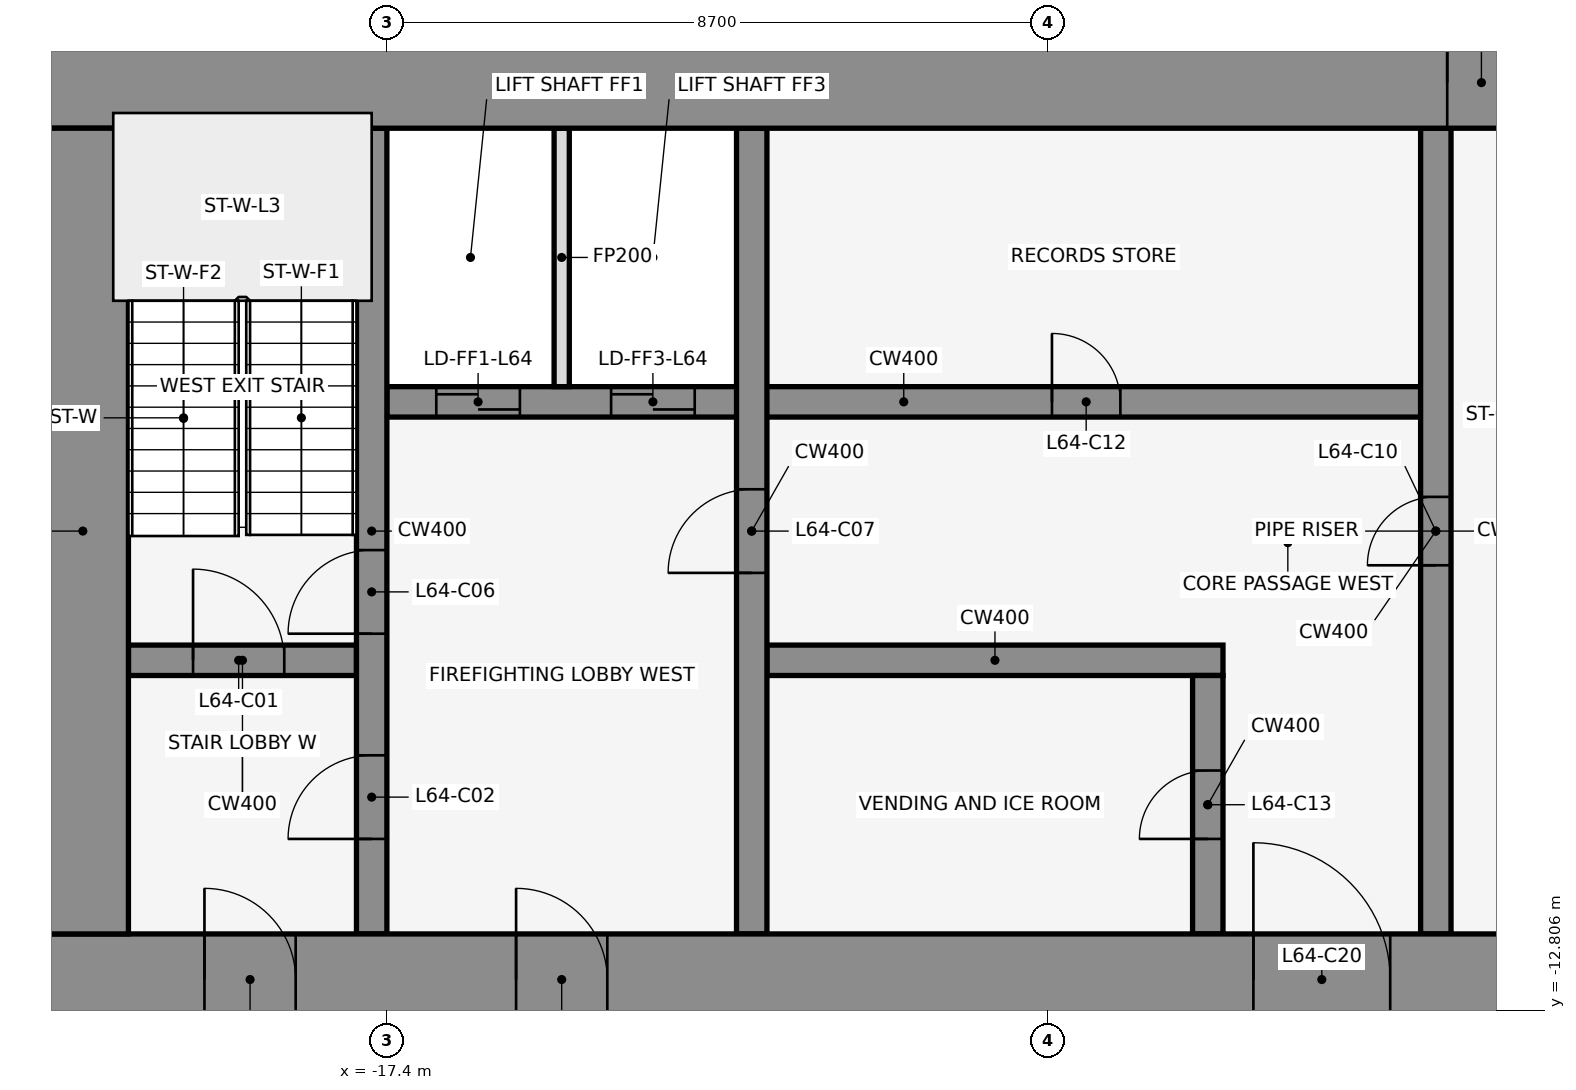
"""IFC4 building model, lengths in metres.
Left out: names, types, materials, properties, quantities, classifications, styles, units other than length and angle.
Written with IfcOpenShell. Run it as: python <this file> out.ifc"""

import sys

from ifc_helpers import new_model, si_unit, direction, frame, frame_2d, origin, place, context, subcontext, project, spatial, rectangle, extrude, element, fill, save


model = new_model("IFC4")
c1 = context("Model", 3, precision=1e-05, world=origin(), true_north=direction((0.0, 1.0)))
c2 = subcontext(c1, "Body", "Model", "MODEL_VIEW")
j1 = project(units=[si_unit("LENGTHUNIT", "METRE"), si_unit("PLANEANGLEUNIT", "RADIAN")], contexts=[c1])
p1 = place(None, origin())
s1 = spatial("IfcSite", under=j1, at=p1, CompositionType="ELEMENT")
p2 = place(p1, origin())
s2 = spatial("IfcBuilding", under=s1, at=p2, CompositionType="ELEMENT")
p3 = place(p2, frame((0.0, 0.0, 283.4)))
s3 = spatial("IfcBuildingStorey", under=s2, at=p3, CompositionType="ELEMENT", Elevation=283.4)
p4 = place(p3, frame((-14.599, 1.08, 0.0), z_axis=(0.0, 0.0, 1.0), x_axis=(-0.83981312244, -0.542875602121, 0.0)))
e1 = element("IfcWall", 1, at=p4, inside=s3, PredefinedType="STANDARD", context=c2, shape_type="SweptSolid", body=[
    extrude(rectangle(XDim=2.183, YDim=0.25, at=frame_2d((1.091, 0.0))), origin(), (0.0, 0.0, 1.0), 4.0),
])
p5 = place(p3, frame((-20.8, -8.2, 0.0), z_axis=(0.0, 0.0, 1.0), x_axis=(1.0, 0.0, 0.0)))
e2 = element("IfcWall", 2, at=p5, inside=s3, PredefinedType="SHEAR", context=c2, shape_type="SweptSolid", body=[
    extrude(rectangle(XDim=3.0, YDim=0.4, at=frame_2d((1.5, 0.0))), origin(), (0.0, 0.0, 1.0), 4.2),
])
p6 = place(p5, frame((0.85, 0.0, 0.0)))
e3 = element("IfcOpeningElement", 3, at=p6, cuts=e2, PredefinedType="OPENING", context=c2, shape_type="SweptSolid", body=[
    extrude(rectangle(XDim=1.2, YDim=2.1, at=frame_2d((0.6, 1.05))), frame((0.0, 0.212, 0.0), z_axis=(0.0, -1.0, 0.0), x_axis=(1.0, 0.0, 0.0)), (0.0, 0.0, 1.0), 0.424),
])
p7 = place(p3, frame((-12.4, -8.2, 0.0), z_axis=(0.0, 0.0, 1.0), x_axis=(1.0, 0.0, 0.0)))
e4 = element("IfcWall", 4, at=p7, inside=s3, PredefinedType="SHEAR", context=c2, shape_type="SweptSolid", body=[
    extrude(rectangle(XDim=6.0, YDim=0.4, at=frame_2d((3.0, 0.0))), origin(), (0.0, 0.0, 1.0), 4.2),
])
p8 = place(p3, frame((-17.4, -4.8, 0.0), z_axis=(0.0, 0.0, 1.0), x_axis=(1.0, 0.0, 0.0)))
e5 = element("IfcWall", 5, at=p8, inside=s3, PredefinedType="SHEAR", context=c2, shape_type="SweptSolid", body=[
    extrude(rectangle(XDim=13.6, YDim=0.4, at=frame_2d((6.8, 0.0))), origin(), (0.0, 0.0, 1.0), 4.2),
])
p9 = place(p8, frame((0.65, 0.0, 0.0)))
e6 = element("IfcOpeningElement", 6, at=p9, cuts=e5, PredefinedType="OPENING", context=c2, shape_type="SweptSolid", body=[
    extrude(rectangle(XDim=1.1, YDim=2.1, at=frame_2d((0.55, 1.05))), frame((0.0, 0.212, 0.0), z_axis=(0.0, -1.0, 0.0), x_axis=(1.0, 0.0, 0.0)), (0.0, 0.0, 1.0), 0.424),
])
p10 = place(p8, frame((2.95, 0.0, 0.0)))
e7 = element("IfcOpeningElement", 7, at=p10, cuts=e5, PredefinedType="OPENING", context=c2, shape_type="SweptSolid", body=[
    extrude(rectangle(XDim=1.1, YDim=2.1, at=frame_2d((0.55, 1.05))), frame((0.0, 0.212, 0.0), z_axis=(0.0, -1.0, 0.0), x_axis=(1.0, 0.0, 0.0)), (0.0, 0.0, 1.0), 0.424),
])
p11 = place(p8, frame((8.75, 0.0, 0.0)))
e8 = element("IfcOpeningElement", 8, at=p11, cuts=e5, PredefinedType="OPENING", context=c2, shape_type="SweptSolid", body=[
    extrude(rectangle(XDim=0.9, YDim=2.1, at=frame_2d((0.45, 1.05))), frame((0.0, 0.212, 0.0), z_axis=(0.0, -1.0, 0.0), x_axis=(1.0, 0.0, 0.0)), (0.0, 0.0, 1.0), 0.424),
])
p12 = place(p3, frame((-17.6, -11.8, 0.0), z_axis=(0.0, 0.0, 1.0), x_axis=(0.0, 1.0, 0.0)))
e9 = element("IfcWall", 9, at=p12, inside=s3, PredefinedType="SHEAR", context=c2, shape_type="SweptSolid", body=[
    extrude(rectangle(XDim=10.6, YDim=0.4, at=frame_2d((5.3, 0.0))), origin(), (0.0, 0.0, 1.0), 4.2),
])
p13 = place(p12, frame((1.25, 0.0, 0.0)))
e10 = element("IfcOpeningElement", 10, at=p13, cuts=e9, PredefinedType="OPENING", context=c2, shape_type="SweptSolid", body=[
    extrude(rectangle(XDim=1.1, YDim=2.1, at=frame_2d((0.55, 1.05))), frame((0.0, 0.212, 0.0), z_axis=(0.0, -1.0, 0.0), x_axis=(1.0, 0.0, 0.0)), (0.0, 0.0, 1.0), 0.424),
])
p14 = place(p12, frame((3.95, 0.0, 0.0)))
e11 = element("IfcOpeningElement", 11, at=p14, cuts=e9, PredefinedType="OPENING", context=c2, shape_type="SweptSolid", body=[
    extrude(rectangle(XDim=1.1, YDim=2.1, at=frame_2d((0.55, 1.05))), frame((0.0, 0.212, 0.0), z_axis=(0.0, -1.0, 0.0), x_axis=(1.0, 0.0, 0.0)), (0.0, 0.0, 1.0), 0.424),
])
p15 = place(p3, frame((-15.1, -4.6, 0.0), z_axis=(0.0, 0.0, 1.0), x_axis=(0.0, 1.0, 0.0)))
e12 = element("IfcWall", 12, at=p15, inside=s3, PredefinedType="PARTITIONING", context=c2, shape_type="SweptSolid", body=[
    extrude(rectangle(XDim=3.4, YDim=0.2, at=frame_2d((1.7, 0.0))), origin(), (0.0, 0.0, 1.0), 3.068),
])
p16 = place(p3, frame((-12.6, -11.8, 0.0), z_axis=(0.0, 0.0, 1.0), x_axis=(0.0, 1.0, 0.0)))
e13 = element("IfcWall", 13, at=p16, inside=s3, PredefinedType="SHEAR", context=c2, shape_type="SweptSolid", body=[
    extrude(rectangle(XDim=10.6, YDim=0.4, at=frame_2d((5.3, 0.0))), origin(), (0.0, 0.0, 1.0), 4.2),
])
p17 = place(p16, frame((4.75, 0.0, 0.0)))
e14 = element("IfcOpeningElement", 14, at=p17, cuts=e13, PredefinedType="OPENING", context=c2, shape_type="SweptSolid", body=[
    extrude(rectangle(XDim=1.1, YDim=2.1, at=frame_2d((0.55, 1.05))), frame((0.0, 0.212, 0.0), z_axis=(0.0, -1.0, 0.0), x_axis=(1.0, 0.0, 0.0)), (0.0, 0.0, 1.0), 0.424),
])
p18 = place(p3, frame((-6.6, -11.8, 0.0), z_axis=(0.0, 0.0, 1.0), x_axis=(0.0, 1.0, 0.0)))
e15 = element("IfcWall", 15, at=p18, inside=s3, PredefinedType="SHEAR", context=c2, shape_type="SweptSolid", body=[
    extrude(rectangle(XDim=3.4, YDim=0.4, at=frame_2d((1.7, 0.0))), origin(), (0.0, 0.0, 1.0), 4.2),
])
p19 = place(p18, frame((1.25, 0.0, 0.0)))
e16 = element("IfcOpeningElement", 16, at=p19, cuts=e15, PredefinedType="OPENING", context=c2, shape_type="SweptSolid", body=[
    extrude(rectangle(XDim=0.9, YDim=2.1, at=frame_2d((0.45, 1.05))), frame((0.0, 0.212, 0.0), z_axis=(0.0, -1.0, 0.0), x_axis=(1.0, 0.0, 0.0)), (0.0, 0.0, 1.0), 0.424),
])
p20 = place(p3, frame((-3.6, -11.8, 0.0), z_axis=(0.0, 0.0, 1.0), x_axis=(0.0, 1.0, 0.0)))
e17 = element("IfcWall", 17, at=p20, inside=s3, PredefinedType="SHEAR", context=c2, shape_type="SweptSolid", body=[
    extrude(rectangle(XDim=10.6, YDim=0.4, at=frame_2d((5.3, 0.0))), origin(), (0.0, 0.0, 1.0), 4.2),
])
p21 = place(p20, frame((4.85, 0.0, 0.0)))
e18 = element("IfcOpeningElement", 18, at=p21, cuts=e17, PredefinedType="OPENING", context=c2, shape_type="SweptSolid", body=[
    extrude(rectangle(XDim=0.9, YDim=2.1, at=frame_2d((0.45, 1.05))), frame((0.0, 0.212, 0.0), z_axis=(0.0, -1.0, 0.0), x_axis=(1.0, 0.0, 0.0)), (0.0, 0.0, 1.0), 0.424),
])
p22 = place(p3, frame((-22.0, -0.6, 0.0), z_axis=(0.0, 0.0, 1.0), x_axis=(1.0, 0.0, 0.0)))
e19 = element("IfcWall", 19, at=p22, inside=s3, PredefinedType="SHEAR", context=c2, shape_type="SweptSolid", body=[
    extrude(rectangle(XDim=44.0, YDim=1.2, at=frame_2d((22.0, 0.0))), origin(), (0.0, 0.0, 1.0), 4.2),
])
p23 = place(p22, frame((18.55, 0.0, 0.0)))
e20 = element("IfcOpeningElement", 20, at=p23, cuts=e19, PredefinedType="OPENING", context=c2, shape_type="SweptSolid", body=[
    extrude(rectangle(XDim=0.9, YDim=2.1, at=frame_2d((0.45, 1.05))), frame((0.0, 0.612, 0.0), z_axis=(0.0, -1.0, 0.0), x_axis=(1.0, 0.0, 0.0)), (0.0, 0.0, 1.0), 1.224),
])
p24 = place(p22, frame((24.55, 0.0, 0.0)))
e21 = element("IfcOpeningElement", 21, at=p24, cuts=e19, PredefinedType="OPENING", context=c2, shape_type="SweptSolid", body=[
    extrude(rectangle(XDim=0.9, YDim=2.1, at=frame_2d((0.45, 1.05))), frame((0.0, 0.612, 0.0), z_axis=(0.0, -1.0, 0.0), x_axis=(1.0, 0.0, 0.0)), (0.0, 0.0, 1.0), 1.224),
])
p25 = place(p3, frame((-22.0, -12.4, 0.0), z_axis=(0.0, 0.0, 1.0), x_axis=(1.0, 0.0, 0.0)))
e22 = element("IfcWall", 22, at=p25, inside=s3, PredefinedType="SHEAR", context=c2, shape_type="SweptSolid", body=[
    extrude(rectangle(XDim=44.0, YDim=1.2, at=frame_2d((22.0, 0.0))), origin(), (0.0, 0.0, 1.0), 4.2),
])
p26 = place(p25, frame((2.2, 0.0, 0.0)))
e23 = element("IfcOpeningElement", 23, at=p26, cuts=e22, PredefinedType="OPENING", context=c2, shape_type="SweptSolid", body=[
    extrude(rectangle(XDim=1.2, YDim=2.1, at=frame_2d((0.6, 1.05))), frame((0.0, 0.612, 0.0), z_axis=(0.0, -1.0, 0.0), x_axis=(1.0, 0.0, 0.0)), (0.0, 0.0, 1.0), 1.224),
])
p27 = place(p25, frame((21.4, 0.0, 0.0)))
e24 = element("IfcOpeningElement", 24, at=p27, cuts=e22, PredefinedType="OPENING", context=c2, shape_type="SweptSolid", body=[
    extrude(rectangle(XDim=1.2, YDim=2.1, at=frame_2d((0.6, 1.05))), frame((0.0, 0.612, 0.0), z_axis=(0.0, -1.0, 0.0), x_axis=(1.0, 0.0, 0.0)), (0.0, 0.0, 1.0), 1.224),
])
p28 = place(p25, frame((40.6, 0.0, 0.0)))
e25 = element("IfcOpeningElement", 25, at=p28, cuts=e22, PredefinedType="OPENING", context=c2, shape_type="SweptSolid", body=[
    extrude(rectangle(XDim=1.2, YDim=2.1, at=frame_2d((0.6, 1.05))), frame((0.0, 0.612, 0.0), z_axis=(0.0, -1.0, 0.0), x_axis=(1.0, 0.0, 0.0)), (0.0, 0.0, 1.0), 1.224),
])
p29 = place(p25, frame((16.0, 0.0, 0.0)))
e26 = element("IfcOpeningElement", 26, at=p29, cuts=e22, PredefinedType="OPENING", context=c2, shape_type="SweptSolid", body=[
    extrude(rectangle(XDim=1.8, YDim=2.1, at=frame_2d((0.9, 1.05))), frame((0.0, 0.612, 0.0), z_axis=(0.0, -1.0, 0.0), x_axis=(1.0, 0.0, 0.0)), (0.0, 0.0, 1.0), 1.224),
])
p30 = place(p25, frame((6.3, 0.0, 0.0)))
e27 = element("IfcOpeningElement", 27, at=p30, cuts=e22, PredefinedType="OPENING", context=c2, shape_type="SweptSolid", body=[
    extrude(rectangle(XDim=1.2, YDim=2.1, at=frame_2d((0.6, 1.05))), frame((0.0, 0.612, 0.0), z_axis=(0.0, -1.0, 0.0), x_axis=(1.0, 0.0, 0.0)), (0.0, 0.0, 1.0), 1.224),
])
p31 = place(p25, frame((26.2, 0.0, 0.0)))
e28 = element("IfcOpeningElement", 28, at=p31, cuts=e22, PredefinedType="OPENING", context=c2, shape_type="SweptSolid", body=[
    extrude(rectangle(XDim=1.8, YDim=2.1, at=frame_2d((0.9, 1.05))), frame((0.0, 0.612, 0.0), z_axis=(0.0, -1.0, 0.0), x_axis=(1.0, 0.0, 0.0)), (0.0, 0.0, 1.0), 1.224),
])
p32 = place(p25, frame((36.5, 0.0, 0.0)))
e29 = element("IfcOpeningElement", 29, at=p32, cuts=e22, PredefinedType="OPENING", context=c2, shape_type="SweptSolid", body=[
    extrude(rectangle(XDim=1.2, YDim=2.1, at=frame_2d((0.6, 1.05))), frame((0.0, 0.612, 0.0), z_axis=(0.0, -1.0, 0.0), x_axis=(1.0, 0.0, 0.0)), (0.0, 0.0, 1.0), 1.224),
])
p33 = place(p3, frame((-21.4, -11.8, 0.0), z_axis=(0.0, 0.0, 1.0), x_axis=(0.0, 1.0, 0.0)))
e30 = element("IfcWall", 30, at=p33, inside=s3, PredefinedType="SHEAR", context=c2, shape_type="SweptSolid", body=[
    extrude(rectangle(XDim=10.6, YDim=1.2, at=frame_2d((5.3, 0.0))), origin(), (0.0, 0.0, 1.0), 4.2),
])
p34 = place(p6, origin())
e31 = element("IfcDoor", 31, at=p34, inside=s3, OperationType="SINGLE_SWING_LEFT", PredefinedType="DOOR", context=c2, shape_type="SweptSolid", body=[
    extrude(rectangle(XDim=1.2, YDim=2.1, at=frame_2d((0.6, 1.05))), frame((0.0, 0.025, 0.0), z_axis=(0.0, -1.0, 0.0), x_axis=(1.0, 0.0, 0.0)), (0.0, 0.0, 1.0), 0.05),
])
fill(e3, e31)
p35 = place(p13, frame((1.1, 0.0, 0.0), z_axis=(0.0, 0.0, 1.0), x_axis=(-1.0, 0.0, 0.0)))
e32 = element("IfcDoor", 32, at=p35, inside=s3, OperationType="SINGLE_SWING_LEFT", PredefinedType="DOOR", context=c2, shape_type="SweptSolid", body=[
    extrude(rectangle(XDim=1.1, YDim=2.1, at=frame_2d((0.55, 1.05))), frame((0.0, 0.025, 0.0), z_axis=(0.0, -1.0, 0.0), x_axis=(1.0, 0.0, 0.0)), (0.0, 0.0, 1.0), 0.05),
])
fill(e10, e32)
p36 = place(p9, origin())
e33 = element("IfcDoor", 33, at=p36, inside=s3, OperationType="DOUBLE_DOOR_SLIDING", PredefinedType="DOOR", context=c2, shape_type="SweptSolid", body=[
    extrude(rectangle(XDim=1.1, YDim=2.1, at=frame_2d((0.55, 1.05))), frame((0.0, 0.025, 0.0), z_axis=(0.0, -1.0, 0.0), x_axis=(1.0, 0.0, 0.0)), (0.0, 0.0, 1.0), 0.05),
])
fill(e6, e33)
p37 = place(p10, origin())
e34 = element("IfcDoor", 34, at=p37, inside=s3, OperationType="DOUBLE_DOOR_SLIDING", PredefinedType="DOOR", context=c2, shape_type="SweptSolid", body=[
    extrude(rectangle(XDim=1.1, YDim=2.1, at=frame_2d((0.55, 1.05))), frame((0.0, 0.025, 0.0), z_axis=(0.0, -1.0, 0.0), x_axis=(1.0, 0.0, 0.0)), (0.0, 0.0, 1.0), 0.05),
])
fill(e7, e34)
p38 = place(p14, frame((1.1, 0.0, 0.0), z_axis=(0.0, 0.0, 1.0), x_axis=(-1.0, 0.0, 0.0)))
e35 = element("IfcDoor", 35, at=p38, inside=s3, OperationType="SINGLE_SWING_LEFT", PredefinedType="DOOR", context=c2, shape_type="SweptSolid", body=[
    extrude(rectangle(XDim=1.1, YDim=2.1, at=frame_2d((0.55, 1.05))), frame((0.0, 0.025, 0.0), z_axis=(0.0, -1.0, 0.0), x_axis=(1.0, 0.0, 0.0)), (0.0, 0.0, 1.0), 0.05),
])
fill(e11, e35)
p39 = place(p17, origin())
e36 = element("IfcDoor", 36, at=p39, inside=s3, OperationType="SINGLE_SWING_LEFT", PredefinedType="DOOR", context=c2, shape_type="SweptSolid", body=[
    extrude(rectangle(XDim=1.1, YDim=2.1, at=frame_2d((0.55, 1.05))), frame((0.0, 0.025, 0.0), z_axis=(0.0, -1.0, 0.0), x_axis=(1.0, 0.0, 0.0)), (0.0, 0.0, 1.0), 0.05),
])
fill(e14, e36)
p40 = place(p21, frame((0.9, 0.0, 0.0), z_axis=(0.0, 0.0, 1.0), x_axis=(-1.0, 0.0, 0.0)))
e37 = element("IfcDoor", 37, at=p40, inside=s3, OperationType="SINGLE_SWING_LEFT", PredefinedType="DOOR", context=c2, shape_type="SweptSolid", body=[
    extrude(rectangle(XDim=0.9, YDim=2.1, at=frame_2d((0.45, 1.05))), frame((0.0, 0.025, 0.0), z_axis=(0.0, -1.0, 0.0), x_axis=(1.0, 0.0, 0.0)), (0.0, 0.0, 1.0), 0.05),
])
fill(e18, e37)
p41 = place(p11, origin())
e38 = element("IfcDoor", 38, at=p41, inside=s3, OperationType="SINGLE_SWING_RIGHT", PredefinedType="DOOR", context=c2, shape_type="SweptSolid", body=[
    extrude(rectangle(XDim=0.9, YDim=2.1, at=frame_2d((0.45, 1.05))), frame((0.0, 0.025, 0.0), z_axis=(0.0, -1.0, 0.0), x_axis=(1.0, 0.0, 0.0)), (0.0, 0.0, 1.0), 0.05),
])
fill(e8, e38)
p42 = place(p19, origin())
e39 = element("IfcDoor", 39, at=p42, inside=s3, OperationType="SINGLE_SWING_LEFT", PredefinedType="DOOR", context=c2, shape_type="SweptSolid", body=[
    extrude(rectangle(XDim=0.9, YDim=2.1, at=frame_2d((0.45, 1.05))), frame((0.0, 0.025, 0.0), z_axis=(0.0, -1.0, 0.0), x_axis=(1.0, 0.0, 0.0)), (0.0, 0.0, 1.0), 0.05),
])
fill(e16, e39)
p43 = place(p23, origin())
e40 = element("IfcDoor", 40, at=p43, inside=s3, OperationType="SINGLE_SWING_LEFT", PredefinedType="DOOR", context=c2, shape_type="SweptSolid", body=[
    extrude(rectangle(XDim=0.9, YDim=2.1, at=frame_2d((0.45, 1.05))), frame((0.0, 0.025, 0.0), z_axis=(0.0, -1.0, 0.0), x_axis=(1.0, 0.0, 0.0)), (0.0, 0.0, 1.0), 0.05),
])
fill(e20, e40)
p44 = place(p26, frame((1.2, 0.0, 0.0), z_axis=(0.0, 0.0, 1.0), x_axis=(-1.0, 0.0, 0.0)))
e41 = element("IfcDoor", 41, at=p44, inside=s3, OperationType="SINGLE_SWING_RIGHT", PredefinedType="DOOR", context=c2, shape_type="SweptSolid", body=[
    extrude(rectangle(XDim=1.2, YDim=2.1, at=frame_2d((0.6, 1.05))), frame((0.0, 0.025, 0.0), z_axis=(0.0, -1.0, 0.0), x_axis=(1.0, 0.0, 0.0)), (0.0, 0.0, 1.0), 0.05),
])
fill(e23, e41)
p45 = place(p29, origin())
e42 = element("IfcDoor", 42, at=p45, inside=s3, OperationType="SINGLE_SWING_LEFT", PredefinedType="DOOR", context=c2, shape_type="SweptSolid", body=[
    extrude(rectangle(XDim=1.8, YDim=2.1, at=frame_2d((0.9, 1.05))), frame((0.0, 0.025, 0.0), z_axis=(0.0, -1.0, 0.0), x_axis=(1.0, 0.0, 0.0)), (0.0, 0.0, 1.0), 0.05),
])
fill(e26, e42)
p46 = place(p30, frame((1.2, 0.0, 0.0), z_axis=(0.0, 0.0, 1.0), x_axis=(-1.0, 0.0, 0.0)))
e43 = element("IfcDoor", 43, at=p46, inside=s3, OperationType="SINGLE_SWING_RIGHT", PredefinedType="DOOR", context=c2, shape_type="SweptSolid", body=[
    extrude(rectangle(XDim=1.2, YDim=2.1, at=frame_2d((0.6, 1.05))), frame((0.0, 0.025, 0.0), z_axis=(0.0, -1.0, 0.0), x_axis=(1.0, 0.0, 0.0)), (0.0, 0.0, 1.0), 0.05),
])
fill(e27, e43)
save(model, sys.argv[1])
